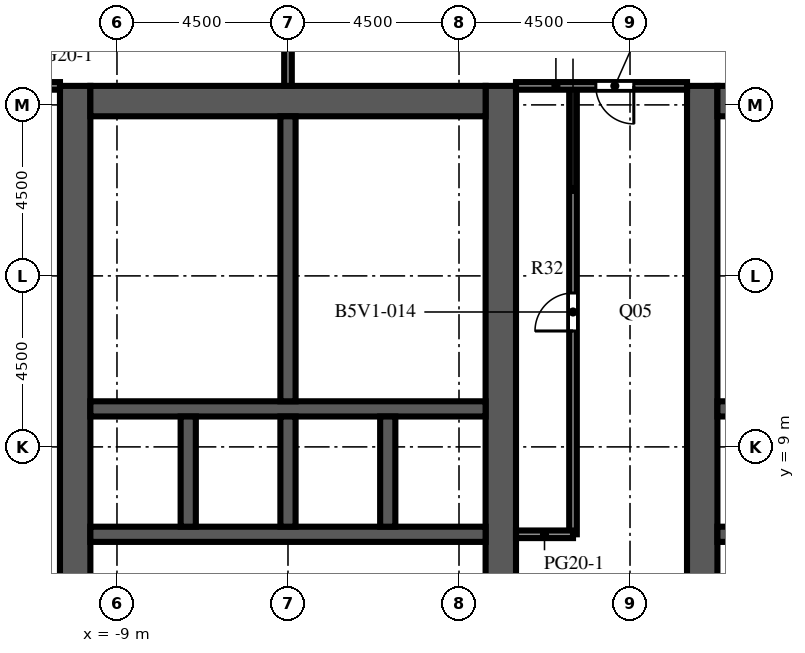
"""IFC4 building model, lengths in metres.
Left out: names, types, materials, properties, quantities, classifications, styles, units other than length and angle.
Written with IfcOpenShell. Run it as: python <this file> out.ifc"""

import sys

from ifc_helpers import new_model, si_unit, direction, frame, frame_2d, origin, place, context, subcontext, project, spatial, rectangle, extrude, element, fill, save


model = new_model("IFC4")
c1 = context("Model", 3, precision=1e-05, world=origin(), true_north=direction((0.0, 1.0)))
c2 = subcontext(c1, "Body", "Model", "MODEL_VIEW")
j1 = project(units=[si_unit("LENGTHUNIT", "METRE"), si_unit("PLANEANGLEUNIT", "RADIAN")], contexts=[c1])
p1 = place(None, origin())
s1 = spatial("IfcSite", under=j1, at=p1, CompositionType="ELEMENT")
p2 = place(p1, origin())
s2 = spatial("IfcBuilding", under=s1, at=p2, CompositionType="ELEMENT")
p3 = place(p2, frame((0.0, 0.0, 173.2)))
s3 = spatial("IfcBuildingStorey", under=s2, at=p3, CompositionType="ELEMENT", Elevation=173.2)
p4 = place(p3, frame((-10.1, -9.0, 0.0), z_axis=(0.0, 0.0, 1.0), x_axis=(0.0, 1.0, 0.0)))
e1 = element("IfcWall", 1, at=p4, inside=s3, PredefinedType="SHEAR", context=c2, shape_type="SweptSolid", body=[
    extrude(rectangle(XDim=27.5, YDim=0.8, at=frame_2d((13.75, 0.0))), origin(), (0.0, 0.0, 1.0), 4.1),
])
p5 = place(p4, frame((12.55, 0.0, 0.0)))
e2 = element("IfcOpeningElement", 2, at=p5, cuts=e1, PredefinedType="OPENING", context=c2, shape_type="SweptSolid", body=[
    extrude(rectangle(XDim=2.4, YDim=2.4, at=frame_2d((1.2, 1.2))), frame((0.0, 0.41, 0.0), z_axis=(0.0, -1.0, 0.0), x_axis=(1.0, 0.0, 0.0)), (0.0, 0.0, 1.0), 0.82),
])
p6 = place(p4, frame((6.825, 0.0, 0.0)))
e3 = element("IfcOpeningElement", 3, at=p6, cuts=e1, PredefinedType="OPENING", context=c2, shape_type="SweptSolid", body=[
    extrude(rectangle(XDim=1.2, YDim=2.1, at=frame_2d((0.6, 1.05))), frame((0.0, 0.41, 0.0), z_axis=(0.0, -1.0, 0.0), x_axis=(1.0, 0.0, 0.0)), (0.0, 0.0, 1.0), 0.82),
])
p7 = place(p4, frame((19.475, 0.0, 0.0)))
e4 = element("IfcOpeningElement", 4, at=p7, cuts=e1, PredefinedType="OPENING", context=c2, shape_type="SweptSolid", body=[
    extrude(rectangle(XDim=1.2, YDim=2.1, at=frame_2d((0.6, 1.05))), frame((0.0, 0.41, 0.0), z_axis=(0.0, -1.0, 0.0), x_axis=(1.0, 0.0, 0.0)), (0.0, 0.0, 1.0), 0.82),
])
p8 = place(p3, frame((1.1, -9.0, 0.0), z_axis=(0.0, 0.0, 1.0), x_axis=(0.0, 1.0, 0.0)))
e5 = element("IfcWall", 5, at=p8, inside=s3, PredefinedType="SHEAR", context=c2, shape_type="SweptSolid", body=[
    extrude(rectangle(XDim=27.5, YDim=0.8, at=frame_2d((13.75, 0.0))), origin(), (0.0, 0.0, 1.0), 4.1),
])
p9 = place(p8, frame((12.55, 0.0, 0.0)))
e6 = element("IfcOpeningElement", 6, at=p9, cuts=e5, PredefinedType="OPENING", context=c2, shape_type="SweptSolid", body=[
    extrude(rectangle(XDim=2.4, YDim=2.4, at=frame_2d((1.2, 1.2))), frame((0.0, 0.41, 0.0), z_axis=(0.0, -1.0, 0.0), x_axis=(1.0, 0.0, 0.0)), (0.0, 0.0, 1.0), 0.82),
])
p10 = place(p8, frame((3.95, 0.0, 0.0)))
e7 = element("IfcOpeningElement", 7, at=p10, cuts=e5, PredefinedType="OPENING", context=c2, shape_type="SweptSolid", body=[
    extrude(rectangle(XDim=1.2, YDim=2.1, at=frame_2d((0.6, 1.05))), frame((0.0, 0.41, 0.0), z_axis=(0.0, -1.0, 0.0), x_axis=(1.0, 0.0, 0.0)), (0.0, 0.0, 1.0), 0.82),
])
p11 = place(p8, frame((22.35, 0.0, 0.0)))
e8 = element("IfcOpeningElement", 8, at=p11, cuts=e5, PredefinedType="OPENING", context=c2, shape_type="SweptSolid", body=[
    extrude(rectangle(XDim=1.2, YDim=2.1, at=frame_2d((0.6, 1.05))), frame((0.0, 0.41, 0.0), z_axis=(0.0, -1.0, 0.0), x_axis=(1.0, 0.0, 0.0)), (0.0, 0.0, 1.0), 0.82),
])
p12 = place(p3, frame((-9.7, 18.1, 0.0), z_axis=(0.0, 0.0, 1.0), x_axis=(1.0, 0.0, 0.0)))
e9 = element("IfcWall", 9, at=p12, inside=s3, PredefinedType="SHEAR", context=c2, shape_type="SweptSolid", body=[
    extrude(rectangle(XDim=10.4, YDim=0.8, at=frame_2d((5.2, 0.0))), origin(), (0.0, 0.0, 1.0), 4.1),
])
p13 = place(p3, frame((-9.7, 6.7, 0.0), z_axis=(0.0, 0.0, 1.0), x_axis=(1.0, 0.0, 0.0)))
e10 = element("IfcWall", 10, at=p13, inside=s3, PredefinedType="SHEAR", context=c2, shape_type="SweptSolid", body=[
    extrude(rectangle(XDim=10.4, YDim=0.4, at=frame_2d((5.2, 0.0))), origin(), (0.0, 0.0, 1.0), 4.1),
])
p14 = place(p13, frame((3.337, 0.0, 0.0)))
e11 = element("IfcOpeningElement", 11, at=p14, cuts=e10, PredefinedType="OPENING", context=c2, shape_type="SweptSolid", body=[
    extrude(rectangle(XDim=1.1, YDim=2.1, at=frame_2d((0.55, 1.05))), frame((0.0, 0.21, 0.0), z_axis=(0.0, -1.0, 0.0), x_axis=(1.0, 0.0, 0.0)), (0.0, 0.0, 1.0), 0.42),
])
p15 = place(p13, frame((5.962, 0.0, 0.0)))
e12 = element("IfcOpeningElement", 12, at=p15, cuts=e10, PredefinedType="OPENING", context=c2, shape_type="SweptSolid", body=[
    extrude(rectangle(XDim=1.1, YDim=2.1, at=frame_2d((0.55, 1.05))), frame((0.0, 0.21, 0.0), z_axis=(0.0, -1.0, 0.0), x_axis=(1.0, 0.0, 0.0)), (0.0, 0.0, 1.0), 0.42),
])
p16 = place(p13, frame((8.663, 0.0, 0.0)))
e13 = element("IfcOpeningElement", 13, at=p16, cuts=e10, PredefinedType="OPENING", context=c2, shape_type="SweptSolid", body=[
    extrude(rectangle(XDim=1.1, YDim=2.1, at=frame_2d((0.55, 1.05))), frame((0.0, 0.21, 0.0), z_axis=(0.0, -1.0, 0.0), x_axis=(1.0, 0.0, 0.0)), (0.0, 0.0, 1.0), 0.42),
])
p17 = place(p13, frame((0.688, 0.0, 0.0)))
e14 = element("IfcOpeningElement", 14, at=p17, cuts=e10, PredefinedType="OPENING", context=c2, shape_type="SweptSolid", body=[
    extrude(rectangle(XDim=1.0, YDim=2.1, at=frame_2d((0.5, 1.05))), frame((0.0, 0.21, 0.0), z_axis=(0.0, -1.0, 0.0), x_axis=(1.0, 0.0, 0.0)), (0.0, 0.0, 1.0), 0.42),
])
p18 = place(p3, frame((-9.7, 10.0, 0.0), z_axis=(0.0, 0.0, 1.0), x_axis=(1.0, 0.0, 0.0)))
e15 = element("IfcWall", 15, at=p18, inside=s3, PredefinedType="SHEAR", context=c2, shape_type="SweptSolid", body=[
    extrude(rectangle(XDim=10.4, YDim=0.4, at=frame_2d((5.2, 0.0))), origin(), (0.0, 0.0, 1.0), 4.1),
])
for number, where, z_axis, x_axis in (
    (16, (-7.125, 6.9, 0.0), (0.0, 0.0, 1.0), (0.0, 1.0, 0.0)),
    (17, (-4.5, 6.9, 0.0), (0.0, 0.0, 1.0), (0.0, 1.0, 0.0)),
    (18, (-1.875, 6.9, 0.0), (0.0, 0.0, 1.0), (0.0, 1.0, 0.0)),
):
    element("IfcWall", number, at=place(p3, frame(where, z_axis=z_axis, x_axis=x_axis)), inside=s3, PredefinedType="SHEAR", context=c2, shape_type="SweptSolid", body=[
        extrude(rectangle(XDim=2.9, YDim=0.4, at=frame_2d((1.45, 0.0))), origin(), (0.0, 0.0, 1.0), 4.1),
    ])
p19 = place(p3, frame((-4.5, 10.2, 0.0), z_axis=(0.0, 0.0, 1.0), x_axis=(0.0, 1.0, 0.0)))
e19 = element("IfcWall", 19, at=p19, inside=s3, PredefinedType="SHEAR", context=c2, shape_type="SweptSolid", body=[
    extrude(rectangle(XDim=7.5, YDim=0.4, at=frame_2d((3.75, 0.0))), origin(), (0.0, 0.0, 1.0), 4.1),
])
p20 = place(p3, frame((6.4, -9.0, 0.0), z_axis=(0.0, 0.0, 1.0), x_axis=(0.0, 1.0, 0.0)))
e20 = element("IfcWall", 20, at=p20, inside=s3, PredefinedType="SHEAR", context=c2, shape_type="SweptSolid", body=[
    extrude(rectangle(XDim=27.5, YDim=0.8, at=frame_2d((13.75, 0.0))), origin(), (0.0, 0.0, 1.0), 4.1),
])
p21 = place(p20, frame((12.55, 0.0, 0.0)))
e21 = element("IfcOpeningElement", 21, at=p21, cuts=e20, PredefinedType="OPENING", context=c2, shape_type="SweptSolid", body=[
    extrude(rectangle(XDim=2.4, YDim=2.4, at=frame_2d((1.2, 1.2))), frame((0.0, 0.41, 0.0), z_axis=(0.0, -1.0, 0.0), x_axis=(1.0, 0.0, 0.0)), (0.0, 0.0, 1.0), 0.82),
])
p22 = place(p20, frame((3.95, 0.0, 0.0)))
e22 = element("IfcOpeningElement", 22, at=p22, cuts=e20, PredefinedType="OPENING", context=c2, shape_type="SweptSolid", body=[
    extrude(rectangle(XDim=1.2, YDim=2.1, at=frame_2d((0.6, 1.05))), frame((0.0, 0.41, 0.0), z_axis=(0.0, -1.0, 0.0), x_axis=(1.0, 0.0, 0.0)), (0.0, 0.0, 1.0), 0.82),
])
p23 = place(p20, frame((22.35, 0.0, 0.0)))
e23 = element("IfcOpeningElement", 23, at=p23, cuts=e20, PredefinedType="OPENING", context=c2, shape_type="SweptSolid", body=[
    extrude(rectangle(XDim=1.2, YDim=2.1, at=frame_2d((0.6, 1.05))), frame((0.0, 0.41, 0.0), z_axis=(0.0, -1.0, 0.0), x_axis=(1.0, 0.0, 0.0)), (0.0, 0.0, 1.0), 0.82),
])
p24 = place(p3, frame((6.8, 18.1, 0.0), z_axis=(0.0, 0.0, 1.0), x_axis=(1.0, 0.0, 0.0)))
e24 = element("IfcWall", 24, at=p24, inside=s3, PredefinedType="SHEAR", context=c2, shape_type="SweptSolid", body=[
    extrude(rectangle(XDim=10.4, YDim=0.8, at=frame_2d((5.2, 0.0))), origin(), (0.0, 0.0, 1.0), 4.1),
])
p25 = place(p3, frame((6.8, 6.7, 0.0), z_axis=(0.0, 0.0, 1.0), x_axis=(1.0, 0.0, 0.0)))
e25 = element("IfcWall", 25, at=p25, inside=s3, PredefinedType="SHEAR", context=c2, shape_type="SweptSolid", body=[
    extrude(rectangle(XDim=10.4, YDim=0.4, at=frame_2d((5.2, 0.0))), origin(), (0.0, 0.0, 1.0), 4.1),
])
p26 = place(p25, frame((3.337, 0.0, 0.0)))
e26 = element("IfcOpeningElement", 26, at=p26, cuts=e25, PredefinedType="OPENING", context=c2, shape_type="SweptSolid", body=[
    extrude(rectangle(XDim=1.1, YDim=2.1, at=frame_2d((0.55, 1.05))), frame((0.0, 0.21, 0.0), z_axis=(0.0, -1.0, 0.0), x_axis=(1.0, 0.0, 0.0)), (0.0, 0.0, 1.0), 0.42),
])
p27 = place(p25, frame((5.962, 0.0, 0.0)))
e27 = element("IfcOpeningElement", 27, at=p27, cuts=e25, PredefinedType="OPENING", context=c2, shape_type="SweptSolid", body=[
    extrude(rectangle(XDim=1.1, YDim=2.1, at=frame_2d((0.55, 1.05))), frame((0.0, 0.21, 0.0), z_axis=(0.0, -1.0, 0.0), x_axis=(1.0, 0.0, 0.0)), (0.0, 0.0, 1.0), 0.42),
])
p28 = place(p25, frame((8.663, 0.0, 0.0)))
e28 = element("IfcOpeningElement", 28, at=p28, cuts=e25, PredefinedType="OPENING", context=c2, shape_type="SweptSolid", body=[
    extrude(rectangle(XDim=1.1, YDim=2.1, at=frame_2d((0.55, 1.05))), frame((0.0, 0.21, 0.0), z_axis=(0.0, -1.0, 0.0), x_axis=(1.0, 0.0, 0.0)), (0.0, 0.0, 1.0), 0.42),
])
p29 = place(p25, frame((0.688, 0.0, 0.0)))
e29 = element("IfcOpeningElement", 29, at=p29, cuts=e25, PredefinedType="OPENING", context=c2, shape_type="SweptSolid", body=[
    extrude(rectangle(XDim=1.0, YDim=2.1, at=frame_2d((0.5, 1.05))), frame((0.0, 0.21, 0.0), z_axis=(0.0, -1.0, 0.0), x_axis=(1.0, 0.0, 0.0)), (0.0, 0.0, 1.0), 0.42),
])
p30 = place(p3, frame((6.8, 10.0, 0.0), z_axis=(0.0, 0.0, 1.0), x_axis=(1.0, 0.0, 0.0)))
e30 = element("IfcWall", 30, at=p30, inside=s3, PredefinedType="SHEAR", context=c2, shape_type="SweptSolid", body=[
    extrude(rectangle(XDim=10.4, YDim=0.4, at=frame_2d((5.2, 0.0))), origin(), (0.0, 0.0, 1.0), 4.1),
])
p31 = place(p3, frame((-0.7, 10.2, 0.0), z_axis=(0.0, 0.0, 1.0), x_axis=(0.0, 1.0, 0.0)))
e31 = element("IfcWall", 31, at=p31, inside=s3, PredefinedType="PARTITIONING", context=c2, shape_type="SweptSolid", body=[
    extrude(rectangle(XDim=2.25, YDim=0.1, at=frame_2d((1.125, 0.0))), origin(), (0.0, 0.0, 1.0), 3.65),
])
p32 = place(p31, frame((0.625, 0.0, 0.0)))
e32 = element("IfcOpeningElement", 32, at=p32, cuts=e31, PredefinedType="OPENING", context=c2, shape_type="SweptSolid", body=[
    extrude(rectangle(XDim=1.0, YDim=2.1, at=frame_2d((0.5, 1.05))), frame((0.0, 0.06, 0.0), z_axis=(0.0, -1.0, 0.0), x_axis=(1.0, 0.0, 0.0)), (0.0, 0.0, 1.0), 0.12),
])
p33 = place(p3, frame((-0.7, 12.45, 0.0), z_axis=(0.0, 0.0, 1.0), x_axis=(0.0, 1.0, 0.0)))
e33 = element("IfcWall", 33, at=p33, inside=s3, PredefinedType="PARTITIONING", context=c2, shape_type="SweptSolid", body=[
    extrude(rectangle(XDim=2.4, YDim=0.1, at=frame_2d((1.2, 0.0))), origin(), (0.0, 0.0, 1.0), 3.65),
])
p34 = place(p33, frame((0.7, 0.0, 0.0)))
e34 = element("IfcOpeningElement", 34, at=p34, cuts=e33, PredefinedType="OPENING", context=c2, shape_type="SweptSolid", body=[
    extrude(rectangle(XDim=1.0, YDim=2.1, at=frame_2d((0.5, 1.05))), frame((0.0, 0.06, 0.0), z_axis=(0.0, -1.0, 0.0), x_axis=(1.0, 0.0, 0.0)), (0.0, 0.0, 1.0), 0.12),
])
p35 = place(p3, frame((-0.7, 14.85, 0.0), z_axis=(0.0, 0.0, 1.0), x_axis=(0.0, 1.0, 0.0)))
e35 = element("IfcWall", 35, at=p35, inside=s3, PredefinedType="PARTITIONING", context=c2, shape_type="SweptSolid", body=[
    extrude(rectangle(XDim=2.85, YDim=0.1, at=frame_2d((1.425, 0.0))), origin(), (0.0, 0.0, 1.0), 3.65),
])
p36 = place(p35, frame((0.925, 0.0, 0.0)))
e36 = element("IfcOpeningElement", 36, at=p36, cuts=e35, PredefinedType="OPENING", context=c2, shape_type="SweptSolid", body=[
    extrude(rectangle(XDim=1.0, YDim=2.1, at=frame_2d((0.5, 1.05))), frame((0.0, 0.06, 0.0), z_axis=(0.0, -1.0, 0.0), x_axis=(1.0, 0.0, 0.0)), (0.0, 0.0, 1.0), 0.12),
])
for number, where, z_axis, x_axis in (
    (37, (-4.3, 12.45, 0.0), (0.0, 0.0, 1.0), (1.0, 0.0, 0.0)),
    (38, (-4.3, 14.85, 0.0), (0.0, 0.0, 1.0), (1.0, 0.0, 0.0)),
):
    element("IfcWall", number, at=place(p3, frame(where, z_axis=z_axis, x_axis=x_axis)), inside=s3, PredefinedType="PARTITIONING", context=c2, shape_type="SweptSolid", body=[
        extrude(rectangle(XDim=3.6, YDim=0.1, at=frame_2d((1.8, 0.0))), origin(), (0.0, 0.0, 1.0), 3.65),
    ])
p37 = place(p3, frame((-4.5, 18.5, 0.0), z_axis=(0.0, 0.0, 1.0), x_axis=(0.0, 1.0, 0.0)))
e39 = element("IfcWall", 39, at=p37, inside=s3, PredefinedType="PARTITIONING", context=c2, shape_type="SweptSolid", body=[
    extrude(rectangle(XDim=8.0, YDim=0.2, at=frame_2d((4.0, 0.0))), origin(), (0.0, 0.0, 1.0), 3.65),
])
p38 = place(p3, frame((3.0, 6.7, 0.0), z_axis=(0.0, 0.0, 1.0), x_axis=(0.0, 1.0, 0.0)))
e40 = element("IfcWall", 40, at=p38, inside=s3, PredefinedType="PARTITIONING", context=c2, shape_type="SweptSolid", body=[
    extrude(rectangle(XDim=11.8, YDim=0.2, at=frame_2d((5.9, 0.0))), origin(), (0.0, 0.0, 1.0), 3.65),
])
p39 = place(p38, frame((5.35, 0.0, 0.0)))
e41 = element("IfcOpeningElement", 41, at=p39, cuts=e40, PredefinedType="OPENING", context=c2, shape_type="SweptSolid", body=[
    extrude(rectangle(XDim=1.0, YDim=2.1, at=frame_2d((0.5, 1.05))), frame((0.0, 0.11, 0.0), z_axis=(0.0, -1.0, 0.0), x_axis=(1.0, 0.0, 0.0)), (0.0, 0.0, 1.0), 0.22),
])
p40 = place(p3, frame((1.5, 6.7, 0.0), z_axis=(0.0, 0.0, 1.0), x_axis=(1.0, 0.0, 0.0)))
e42 = element("IfcWall", 42, at=p40, inside=s3, PredefinedType="PARTITIONING", context=c2, shape_type="SweptSolid", body=[
    extrude(rectangle(XDim=1.5, YDim=0.2, at=frame_2d((0.75, 0.0))), origin(), (0.0, 0.0, 1.0), 3.65),
])
p41 = place(p3, frame((-13.5, 18.5, 0.0), z_axis=(0.0, 0.0, 1.0), x_axis=(1.0, 0.0, 0.0)))
e43 = element("IfcWall", 43, at=p41, inside=s3, PredefinedType="PARTITIONING", context=c2, shape_type="SweptSolid", body=[
    extrude(rectangle(XDim=3.0, YDim=0.2, at=frame_2d((1.5, 0.0))), origin(), (0.0, 0.0, 1.0), 3.65),
])
p42 = place(p41, frame((0.6, 0.0, 0.0)))
e44 = element("IfcOpeningElement", 44, at=p42, cuts=e43, PredefinedType="OPENING", context=c2, shape_type="SweptSolid", body=[
    extrude(rectangle(XDim=1.0, YDim=2.1, at=frame_2d((0.5, 1.05))), frame((0.0, 0.11, 0.0), z_axis=(0.0, -1.0, 0.0), x_axis=(1.0, 0.0, 0.0)), (0.0, 0.0, 1.0), 0.22),
])
p43 = place(p3, frame((1.5, 18.5, 0.0), z_axis=(0.0, 0.0, 1.0), x_axis=(1.0, 0.0, 0.0)))
e45 = element("IfcWall", 45, at=p43, inside=s3, PredefinedType="PARTITIONING", context=c2, shape_type="SweptSolid", body=[
    extrude(rectangle(XDim=4.5, YDim=0.2, at=frame_2d((2.25, 0.0))), origin(), (0.0, 0.0, 1.0), 3.65),
])
p44 = place(p43, frame((2.1, 0.0, 0.0)))
e46 = element("IfcOpeningElement", 46, at=p44, cuts=e45, PredefinedType="OPENING", context=c2, shape_type="SweptSolid", body=[
    extrude(rectangle(XDim=1.0, YDim=2.1, at=frame_2d((0.5, 1.05))), frame((0.0, 0.11, 0.0), z_axis=(0.0, -1.0, 0.0), x_axis=(1.0, 0.0, 0.0)), (0.0, 0.0, 1.0), 0.22),
])
p45 = place(p14, origin())
e47 = element("IfcDoor", 47, at=p45, inside=s3, OperationType="DOUBLE_DOOR_SLIDING", PredefinedType="DOOR", context=c2, shape_type="SweptSolid", body=[
    extrude(rectangle(XDim=1.1, YDim=2.1, at=frame_2d((0.55, 1.05))), frame((0.0, 0.025, 0.0), z_axis=(0.0, -1.0, 0.0), x_axis=(1.0, 0.0, 0.0)), (0.0, 0.0, 1.0), 0.05),
])
fill(e11, e47)
p46 = place(p15, origin())
e48 = element("IfcDoor", 48, at=p46, inside=s3, OperationType="DOUBLE_DOOR_SLIDING", PredefinedType="DOOR", context=c2, shape_type="SweptSolid", body=[
    extrude(rectangle(XDim=1.1, YDim=2.1, at=frame_2d((0.55, 1.05))), frame((0.0, 0.025, 0.0), z_axis=(0.0, -1.0, 0.0), x_axis=(1.0, 0.0, 0.0)), (0.0, 0.0, 1.0), 0.05),
])
fill(e12, e48)
p47 = place(p16, origin())
e49 = element("IfcDoor", 49, at=p47, inside=s3, OperationType="DOUBLE_DOOR_SLIDING", PredefinedType="DOOR", context=c2, shape_type="SweptSolid", body=[
    extrude(rectangle(XDim=1.1, YDim=2.1, at=frame_2d((0.55, 1.05))), frame((0.0, 0.025, 0.0), z_axis=(0.0, -1.0, 0.0), x_axis=(1.0, 0.0, 0.0)), (0.0, 0.0, 1.0), 0.05),
])
fill(e13, e49)
p48 = place(p5, origin())
e50 = element("IfcDoor", 50, at=p48, inside=s3, OperationType="DOUBLE_DOOR_DOUBLE_SWING", PredefinedType="DOOR", context=c2, shape_type="SweptSolid", body=[
    extrude(rectangle(XDim=2.4, YDim=2.4, at=frame_2d((1.2, 1.2))), frame((0.0, 0.025, 0.0), z_axis=(0.0, -1.0, 0.0), x_axis=(1.0, 0.0, 0.0)), (0.0, 0.0, 1.0), 0.05),
])
fill(e2, e50)
p49 = place(p9, origin())
e51 = element("IfcDoor", 51, at=p49, inside=s3, OperationType="DOUBLE_DOOR_DOUBLE_SWING", PredefinedType="DOOR", context=c2, shape_type="SweptSolid", body=[
    extrude(rectangle(XDim=2.4, YDim=2.4, at=frame_2d((1.2, 1.2))), frame((0.0, 0.025, 0.0), z_axis=(0.0, -1.0, 0.0), x_axis=(1.0, 0.0, 0.0)), (0.0, 0.0, 1.0), 0.05),
])
fill(e6, e51)
p50 = place(p21, origin())
e52 = element("IfcDoor", 52, at=p50, inside=s3, OperationType="DOUBLE_DOOR_DOUBLE_SWING", PredefinedType="DOOR", context=c2, shape_type="SweptSolid", body=[
    extrude(rectangle(XDim=2.4, YDim=2.4, at=frame_2d((1.2, 1.2))), frame((0.0, 0.025, 0.0), z_axis=(0.0, -1.0, 0.0), x_axis=(1.0, 0.0, 0.0)), (0.0, 0.0, 1.0), 0.05),
])
fill(e21, e52)
p51 = place(p7, origin())
e53 = element("IfcDoor", 53, at=p51, inside=s3, OperationType="SINGLE_SWING_LEFT", PredefinedType="DOOR", context=c2, shape_type="SweptSolid", body=[
    extrude(rectangle(XDim=1.2, YDim=2.1, at=frame_2d((0.6, 1.05))), frame((0.0, 0.025, 0.0), z_axis=(0.0, -1.0, 0.0), x_axis=(1.0, 0.0, 0.0)), (0.0, 0.0, 1.0), 0.05),
])
fill(e4, e53)
p52 = place(p17, origin())
e54 = element("IfcDoor", 54, at=p52, inside=s3, OperationType="SINGLE_SWING_LEFT", PredefinedType="DOOR", context=c2, shape_type="SweptSolid", body=[
    extrude(rectangle(XDim=1.0, YDim=2.1, at=frame_2d((0.5, 1.05))), frame((0.0, 0.025, 0.0), z_axis=(0.0, -1.0, 0.0), x_axis=(1.0, 0.0, 0.0)), (0.0, 0.0, 1.0), 0.05),
])
fill(e14, e54)
p53 = place(p11, origin())
e55 = element("IfcDoor", 55, at=p53, inside=s3, OperationType="SINGLE_SWING_LEFT", PredefinedType="DOOR", context=c2, shape_type="SweptSolid", body=[
    extrude(rectangle(XDim=1.2, YDim=2.1, at=frame_2d((0.6, 1.05))), frame((0.0, 0.375, 0.0), z_axis=(0.0, -1.0, 0.0), x_axis=(1.0, 0.0, 0.0)), (0.0, 0.0, 1.0), 0.05),
])
fill(e8, e55)
p54 = place(p32, origin())
e56 = element("IfcDoor", 56, at=p54, inside=s3, OperationType="SINGLE_SWING_RIGHT", PredefinedType="DOOR", context=c2, shape_type="SweptSolid", body=[
    extrude(rectangle(XDim=1.0, YDim=2.1, at=frame_2d((0.5, 1.05))), frame((0.0, 0.025, 0.0), z_axis=(0.0, -1.0, 0.0), x_axis=(1.0, 0.0, 0.0)), (0.0, 0.0, 1.0), 0.05),
])
fill(e32, e56)
p55 = place(p34, origin())
e57 = element("IfcDoor", 57, at=p55, inside=s3, OperationType="SINGLE_SWING_LEFT", PredefinedType="DOOR", context=c2, shape_type="SweptSolid", body=[
    extrude(rectangle(XDim=1.0, YDim=2.1, at=frame_2d((0.5, 1.05))), frame((0.0, 0.025, 0.0), z_axis=(0.0, -1.0, 0.0), x_axis=(1.0, 0.0, 0.0)), (0.0, 0.0, 1.0), 0.05),
])
fill(e34, e57)
p56 = place(p36, origin())
e58 = element("IfcDoor", 58, at=p56, inside=s3, OperationType="SINGLE_SWING_RIGHT", PredefinedType="DOOR", context=c2, shape_type="SweptSolid", body=[
    extrude(rectangle(XDim=1.0, YDim=2.1, at=frame_2d((0.5, 1.05))), frame((0.0, 0.025, 0.0), z_axis=(0.0, -1.0, 0.0), x_axis=(1.0, 0.0, 0.0)), (0.0, 0.0, 1.0), 0.05),
])
fill(e36, e58)
p57 = place(p23, origin())
e59 = element("IfcDoor", 59, at=p57, inside=s3, OperationType="SINGLE_SWING_RIGHT", PredefinedType="DOOR", context=c2, shape_type="SweptSolid", body=[
    extrude(rectangle(XDim=1.2, YDim=2.1, at=frame_2d((0.6, 1.05))), frame((0.0, -0.325, 0.0), z_axis=(0.0, -1.0, 0.0), x_axis=(1.0, 0.0, 0.0)), (0.0, 0.0, 1.0), 0.05),
])
fill(e23, e59)
p58 = place(p39, origin())
e60 = element("IfcDoor", 60, at=p58, inside=s3, OperationType="SINGLE_SWING_LEFT", PredefinedType="DOOR", context=c2, shape_type="SweptSolid", body=[
    extrude(rectangle(XDim=1.0, YDim=2.1, at=frame_2d((0.5, 1.05))), frame((0.0, 0.025, 0.0), z_axis=(0.0, -1.0, 0.0), x_axis=(1.0, 0.0, 0.0)), (0.0, 0.0, 1.0), 0.05),
])
fill(e41, e60)
p59 = place(p44, origin())
e61 = element("IfcDoor", 61, at=p59, inside=s3, OperationType="SINGLE_SWING_RIGHT", PredefinedType="DOOR", context=c2, shape_type="SweptSolid", body=[
    extrude(rectangle(XDim=1.0, YDim=2.1, at=frame_2d((0.5, 1.05))), frame((0.0, 0.025, 0.0), z_axis=(0.0, -1.0, 0.0), x_axis=(1.0, 0.0, 0.0)), (0.0, 0.0, 1.0), 0.05),
])
fill(e46, e61)
save(model, sys.argv[1])
